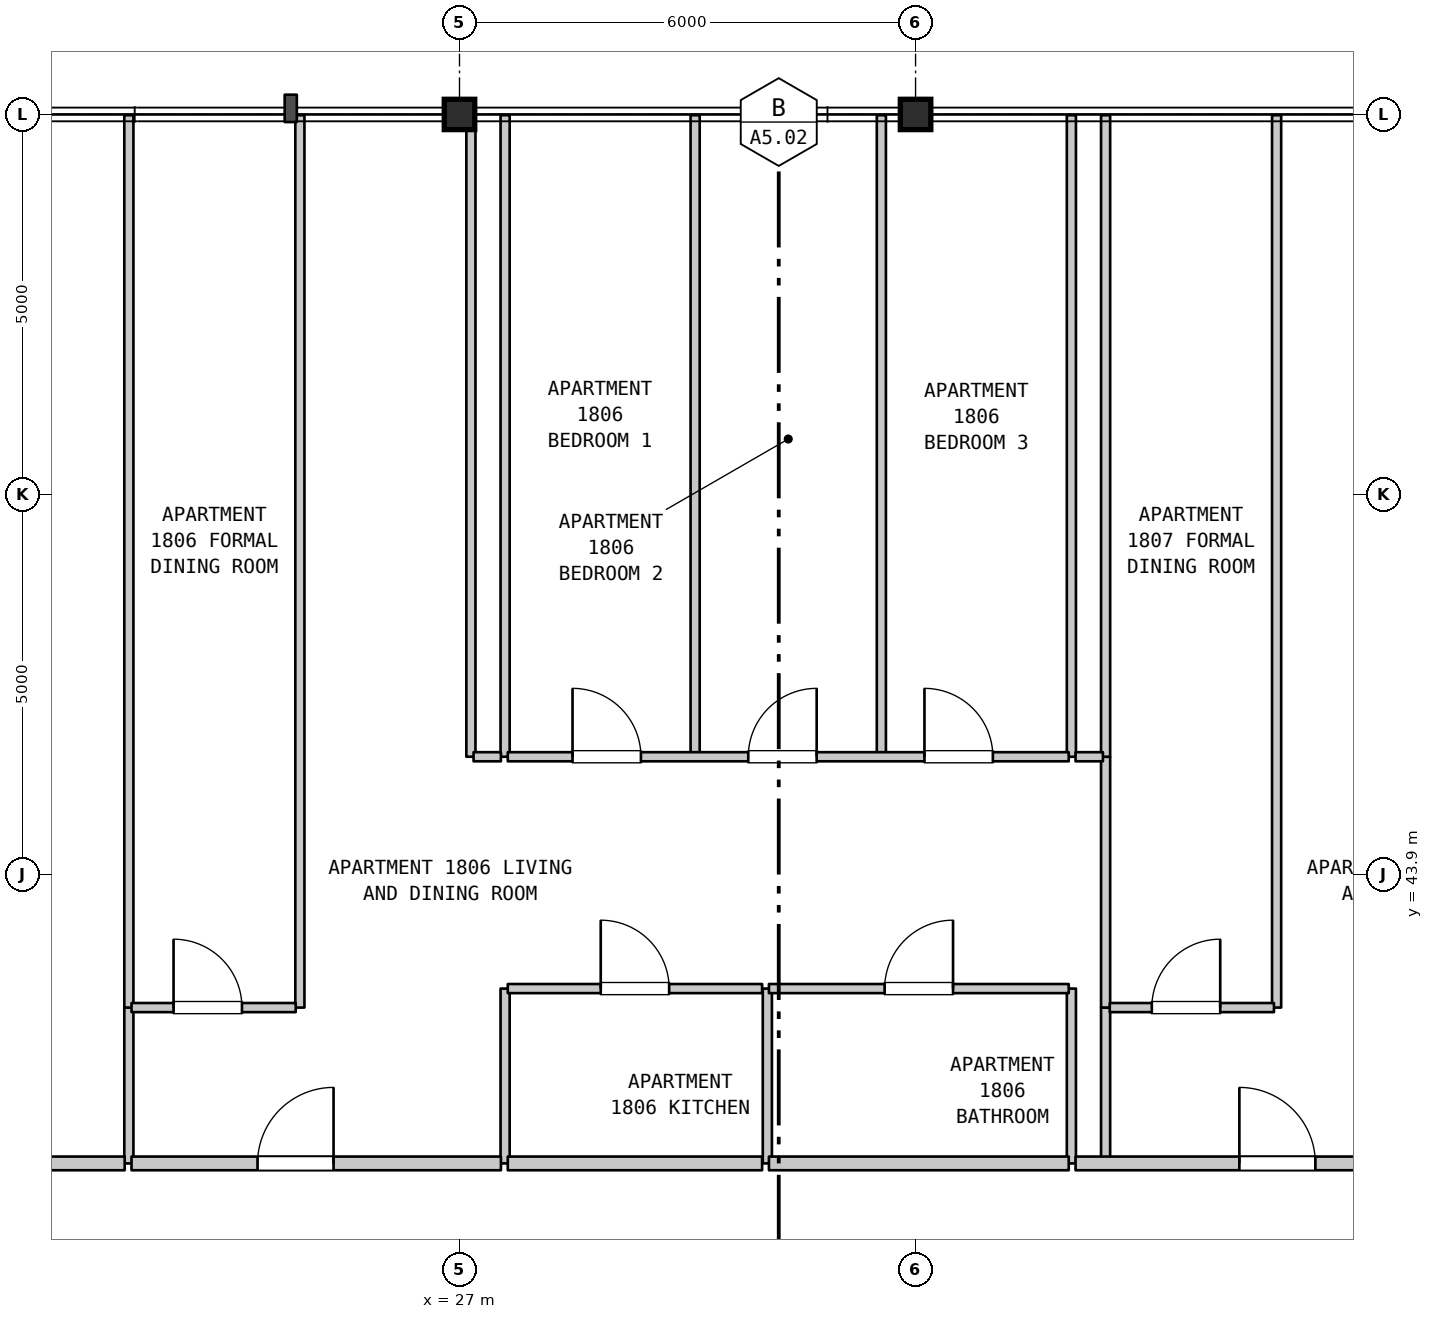
"""IFC4 building model, lengths in metres.
Left out: names, types, materials, properties, quantities, classifications, styles, units other than length and angle.
Written with IfcOpenShell. Run it as: python <this file> out.ifc"""

import sys

from ifc_helpers import new_model, si_unit, direction, frame, frame_2d, origin, origin_2d, place, context, subcontext, project, spatial, rectangle, i_section, extrude, element, fill, save


model = new_model("IFC4")
c1 = context("Model", 3, precision=1e-05, world=origin(), true_north=direction((0.0, 1.0)))
c2 = subcontext(c1, "Body", "Model", "MODEL_VIEW")
j1 = project(units=[si_unit("LENGTHUNIT", "METRE"), si_unit("PLANEANGLEUNIT", "RADIAN")], contexts=[c1])
p1 = place(None, origin())
s1 = spatial("IfcSite", under=j1, at=p1, CompositionType="ELEMENT")
p2 = place(p1, origin())
s2 = spatial("IfcBuilding", under=s1, at=p2, CompositionType="ELEMENT")
p3 = place(p2, frame((0.0, 0.0, 77.5)))
s3 = spatial("IfcBuildingStorey", under=s2, at=p3, CompositionType="ELEMENT", Elevation=77.5)
for number, where, z_axis, x_axis in (
    (1, (27.0, 53.9, 0.0), (0.0, 0.0, 1.0), (1.0, 0.0, 0.0)),
    (2, (33.0, 53.9, 0.0), (0.0, 0.0, 1.0), (1.0, 0.0, 0.0)),
):
    element("IfcColumn", number, at=place(p3, frame(where, z_axis=z_axis, x_axis=x_axis)), inside=s3, PredefinedType="COLUMN", context=c2, shape_type="SweptSolid", body=[
        extrude(i_section(OverallWidth=0.401, OverallDepth=0.399, WebThickness=0.025, FlangeThickness=0.04, FilletRadius=0.015, at=origin_2d()), origin(), (0.0, 0.0, 1.0), 3.7),
    ])
p4 = place(p3, frame((22.65, 40.1, 0.0), z_axis=(0.0, 0.0, 1.0), x_axis=(0.0, 1.0, 0.0)))
e3 = element("IfcWall", 3, at=p4, inside=s3, PredefinedType="PARTITIONING", context=c2, shape_type="SweptSolid", body=[
    extrude(rectangle(XDim=2.05, YDim=0.12, at=frame_2d((1.025, 0.0))), origin(), (0.0, 0.0, 1.0), 3.28),
])
for number, where, z_axis, x_axis in (
    (4, (22.65, 42.15, 0.0), (0.0, 0.0, 1.0), (0.0, 1.0, 0.0)),
    (5, (24.9, 42.15, 0.0), (0.0, 0.0, 1.0), (0.0, 1.0, 0.0)),
):
    element("IfcWall", number, at=place(p3, frame(where, z_axis=z_axis, x_axis=x_axis)), inside=s3, PredefinedType="PARTITIONING", context=c2, shape_type="SweptSolid", body=[
        extrude(rectangle(XDim=11.74, YDim=0.12, at=frame_2d((5.87, 0.0))), origin(), (0.0, 0.0, 1.0), 3.28),
    ])
p5 = place(p3, frame((27.15, 45.45, 0.0), z_axis=(0.0, 0.0, 1.0), x_axis=(0.0, 1.0, 0.0)))
e6 = element("IfcWall", 6, at=p5, inside=s3, PredefinedType="PARTITIONING", context=c2, shape_type="SweptSolid", body=[
    extrude(rectangle(XDim=8.44, YDim=0.12, at=frame_2d((4.22, 0.0))), origin(), (0.0, 0.0, 1.0), 3.28),
])
p6 = place(p3, frame((27.6, 40.1, 0.0), z_axis=(0.0, 0.0, 1.0), x_axis=(0.0, 1.0, 0.0)))
e7 = element("IfcWall", 7, at=p6, inside=s3, PredefinedType="PARTITIONING", context=c2, shape_type="SweptSolid", body=[
    extrude(rectangle(XDim=2.3, YDim=0.12, at=frame_2d((1.15, 0.0))), origin(), (0.0, 0.0, 1.0), 3.28),
])
for number, where, z_axis, x_axis in (
    (8, (27.6, 45.45, 0.0), (0.0, 0.0, 1.0), (0.0, 1.0, 0.0)),
    (9, (30.1, 45.45, 0.0), (0.0, 0.0, 1.0), (0.0, 1.0, 0.0)),
):
    element("IfcWall", number, at=place(p3, frame(where, z_axis=z_axis, x_axis=x_axis)), inside=s3, PredefinedType="PARTITIONING", context=c2, shape_type="SweptSolid", body=[
        extrude(rectangle(XDim=8.44, YDim=0.12, at=frame_2d((4.22, 0.0))), origin(), (0.0, 0.0, 1.0), 3.28),
    ])
p7 = place(p3, frame((31.05, 40.1, 0.0), z_axis=(0.0, 0.0, 1.0), x_axis=(0.0, 1.0, 0.0)))
e10 = element("IfcWall", 10, at=p7, inside=s3, PredefinedType="PARTITIONING", context=c2, shape_type="SweptSolid", body=[
    extrude(rectangle(XDim=2.3, YDim=0.12, at=frame_2d((1.15, 0.0))), origin(), (0.0, 0.0, 1.0), 3.28),
])
p8 = place(p3, frame((32.55, 45.45, 0.0), z_axis=(0.0, 0.0, 1.0), x_axis=(0.0, 1.0, 0.0)))
e11 = element("IfcWall", 11, at=p8, inside=s3, PredefinedType="PARTITIONING", context=c2, shape_type="SweptSolid", body=[
    extrude(rectangle(XDim=8.44, YDim=0.12, at=frame_2d((4.22, 0.0))), origin(), (0.0, 0.0, 1.0), 3.28),
])
p9 = place(p3, frame((35.05, 40.1, 0.0), z_axis=(0.0, 0.0, 1.0), x_axis=(0.0, 1.0, 0.0)))
e12 = element("IfcWall", 12, at=p9, inside=s3, PredefinedType="PARTITIONING", context=c2, shape_type="SweptSolid", body=[
    extrude(rectangle(XDim=2.3, YDim=0.12, at=frame_2d((1.15, 0.0))), origin(), (0.0, 0.0, 1.0), 3.28),
])
p10 = place(p3, frame((35.05, 45.45, 0.0), z_axis=(0.0, 0.0, 1.0), x_axis=(0.0, 1.0, 0.0)))
e13 = element("IfcWall", 13, at=p10, inside=s3, PredefinedType="PARTITIONING", context=c2, shape_type="SweptSolid", body=[
    extrude(rectangle(XDim=8.44, YDim=0.12, at=frame_2d((4.22, 0.0))), origin(), (0.0, 0.0, 1.0), 3.28),
])
p11 = place(p3, frame((35.5, 40.1, 0.0), z_axis=(0.0, 0.0, 1.0), x_axis=(0.0, 1.0, 0.0)))
e14 = element("IfcWall", 14, at=p11, inside=s3, PredefinedType="PARTITIONING", context=c2, shape_type="SweptSolid", body=[
    extrude(rectangle(XDim=2.05, YDim=0.12, at=frame_2d((1.025, 0.0))), origin(), (0.0, 0.0, 1.0), 3.28),
])
p12 = place(p3, frame((35.5, 42.15, 0.0), z_axis=(0.0, 0.0, 1.0), x_axis=(0.0, 1.0, 0.0)))
e15 = element("IfcWall", 15, at=p12, inside=s3, PredefinedType="PARTITIONING", context=c2, shape_type="SweptSolid", body=[
    extrude(rectangle(XDim=3.3, YDim=0.12, at=frame_2d((1.65, 0.0))), origin(), (0.0, 0.0, 1.0), 3.28),
])
p13 = place(p3, frame((35.5, 45.45, 0.0), z_axis=(0.0, 0.0, 1.0), x_axis=(0.0, 1.0, 0.0)))
e16 = element("IfcWall", 16, at=p13, inside=s3, PredefinedType="PARTITIONING", context=c2, shape_type="SweptSolid", body=[
    extrude(rectangle(XDim=8.44, YDim=0.12, at=frame_2d((4.22, 0.0))), origin(), (0.0, 0.0, 1.0), 3.28),
])
p14 = place(p3, frame((37.75, 42.15, 0.0), z_axis=(0.0, 0.0, 1.0), x_axis=(0.0, 1.0, 0.0)))
e17 = element("IfcWall", 17, at=p14, inside=s3, PredefinedType="PARTITIONING", context=c2, shape_type="SweptSolid", body=[
    extrude(rectangle(XDim=11.74, YDim=0.12, at=frame_2d((5.87, 0.0))), origin(), (0.0, 0.0, 1.0), 3.28),
])
p15 = place(p3, frame((20.185, 40.1, 0.0), z_axis=(0.0, 0.0, 1.0), x_axis=(1.0, 0.0, 0.0)))
e18 = element("IfcWall", 18, at=p15, inside=s3, PredefinedType="STANDARD", context=c2, shape_type="SweptSolid", body=[
    extrude(rectangle(XDim=2.41, YDim=0.18, at=frame_2d((1.205, 0.0))), origin(), (0.0, 0.0, 1.0), 3.28),
])
p16 = place(p3, frame((22.685, 40.1, 0.0), z_axis=(0.0, 0.0, 1.0), x_axis=(1.0, 0.0, 0.0)))
e19 = element("IfcWall", 19, at=p16, inside=s3, PredefinedType="STANDARD", context=c2, shape_type="SweptSolid", body=[
    extrude(rectangle(XDim=4.86, YDim=0.18, at=frame_2d((2.43, 0.0))), origin(), (0.0, 0.0, 1.0), 3.28),
])
p17 = place(p16, frame((1.658, 0.0, 0.0)))
e20 = element("IfcOpeningElement", 20, at=p17, cuts=e19, PredefinedType="OPENING", context=c2, shape_type="SweptSolid", body=[
    extrude(rectangle(XDim=1.0, YDim=2.15, at=frame_2d((0.5, 1.075))), frame((0.0, 0.1, 0.0), z_axis=(0.0, -1.0, 0.0), x_axis=(1.0, 0.0, 0.0)), (0.0, 0.0, 1.0), 0.2),
])
p18 = place(p3, frame((27.635, 40.1, 0.0), z_axis=(0.0, 0.0, 1.0), x_axis=(1.0, 0.0, 0.0)))
e21 = element("IfcWall", 21, at=p18, inside=s3, PredefinedType="STANDARD", context=c2, shape_type="SweptSolid", body=[
    extrude(rectangle(XDim=3.346, YDim=0.18, at=frame_2d((1.673, 0.0))), origin(), (0.0, 0.0, 1.0), 3.28),
])
p19 = place(p3, frame((31.071, 40.1, 0.0), z_axis=(0.0, 0.0, 1.0), x_axis=(1.0, 0.0, 0.0)))
e22 = element("IfcWall", 22, at=p19, inside=s3, PredefinedType="STANDARD", context=c2, shape_type="SweptSolid", body=[
    extrude(rectangle(XDim=3.944, YDim=0.18, at=frame_2d((1.972, 0.0))), origin(), (0.0, 0.0, 1.0), 3.28),
])
p20 = place(p3, frame((35.105, 40.1, 0.0), z_axis=(0.0, 0.0, 1.0), x_axis=(1.0, 0.0, 0.0)))
e23 = element("IfcWall", 23, at=p20, inside=s3, PredefinedType="STANDARD", context=c2, shape_type="SweptSolid", body=[
    extrude(rectangle(XDim=5.31, YDim=0.18, at=frame_2d((2.655, 0.0))), origin(), (0.0, 0.0, 1.0), 3.28),
])
p21 = place(p20, frame((2.155, 0.0, 0.0)))
e24 = element("IfcOpeningElement", 24, at=p21, cuts=e23, PredefinedType="OPENING", context=c2, shape_type="SweptSolid", body=[
    extrude(rectangle(XDim=1.0, YDim=2.15, at=frame_2d((0.5, 1.075))), frame((0.0, 0.1, 0.0), z_axis=(0.0, -1.0, 0.0), x_axis=(1.0, 0.0, 0.0)), (0.0, 0.0, 1.0), 0.2),
])
p22 = place(p3, frame((22.685, 42.15, 0.0), z_axis=(0.0, 0.0, 1.0), x_axis=(1.0, 0.0, 0.0)))
e25 = element("IfcWall", 25, at=p22, inside=s3, PredefinedType="PARTITIONING", context=c2, shape_type="SweptSolid", body=[
    extrude(rectangle(XDim=2.16, YDim=0.12, at=frame_2d((1.08, 0.0))), origin(), (0.0, 0.0, 1.0), 3.28),
])
p23 = place(p22, frame((0.553, 0.0, 0.0)))
e26 = element("IfcOpeningElement", 26, at=p23, cuts=e25, PredefinedType="OPENING", context=c2, shape_type="SweptSolid", body=[
    extrude(rectangle(XDim=0.9, YDim=2.15, at=frame_2d((0.45, 1.075))), frame((0.0, 0.07, 0.0), z_axis=(0.0, -1.0, 0.0), x_axis=(1.0, 0.0, 0.0)), (0.0, 0.0, 1.0), 0.14),
])
p24 = place(p3, frame((35.555, 42.15, 0.0), z_axis=(0.0, 0.0, 1.0), x_axis=(1.0, 0.0, 0.0)))
e27 = element("IfcWall", 27, at=p24, inside=s3, PredefinedType="PARTITIONING", context=c2, shape_type="SweptSolid", body=[
    extrude(rectangle(XDim=2.16, YDim=0.12, at=frame_2d((1.08, 0.0))), origin(), (0.0, 0.0, 1.0), 3.28),
])
p25 = place(p24, frame((0.553, 0.0, 0.0)))
e28 = element("IfcOpeningElement", 28, at=p25, cuts=e27, PredefinedType="OPENING", context=c2, shape_type="SweptSolid", body=[
    extrude(rectangle(XDim=0.9, YDim=2.15, at=frame_2d((0.45, 1.075))), frame((0.0, 0.07, 0.0), z_axis=(0.0, -1.0, 0.0), x_axis=(1.0, 0.0, 0.0)), (0.0, 0.0, 1.0), 0.14),
])
p26 = place(p3, frame((27.635, 42.4, 0.0), z_axis=(0.0, 0.0, 1.0), x_axis=(1.0, 0.0, 0.0)))
e29 = element("IfcWall", 29, at=p26, inside=s3, PredefinedType="PARTITIONING", context=c2, shape_type="SweptSolid", body=[
    extrude(rectangle(XDim=3.346, YDim=0.12, at=frame_2d((1.673, 0.0))), origin(), (0.0, 0.0, 1.0), 3.28),
])
p27 = place(p26, frame((1.223, 0.0, 0.0)))
e30 = element("IfcOpeningElement", 30, at=p27, cuts=e29, PredefinedType="OPENING", context=c2, shape_type="SweptSolid", body=[
    extrude(rectangle(XDim=0.9, YDim=2.15, at=frame_2d((0.45, 1.075))), frame((0.0, 0.07, 0.0), z_axis=(0.0, -1.0, 0.0), x_axis=(1.0, 0.0, 0.0)), (0.0, 0.0, 1.0), 0.14),
])
p28 = place(p3, frame((31.071, 42.4, 0.0), z_axis=(0.0, 0.0, 1.0), x_axis=(1.0, 0.0, 0.0)))
e31 = element("IfcWall", 31, at=p28, inside=s3, PredefinedType="PARTITIONING", context=c2, shape_type="SweptSolid", body=[
    extrude(rectangle(XDim=3.944, YDim=0.12, at=frame_2d((1.972, 0.0))), origin(), (0.0, 0.0, 1.0), 3.28),
])
p29 = place(p28, frame((1.522, 0.0, 0.0)))
e32 = element("IfcOpeningElement", 32, at=p29, cuts=e31, PredefinedType="OPENING", context=c2, shape_type="SweptSolid", body=[
    extrude(rectangle(XDim=0.9, YDim=2.1, at=frame_2d((0.45, 1.05))), frame((0.0, 0.07, 0.0), z_axis=(0.0, -1.0, 0.0), x_axis=(1.0, 0.0, 0.0)), (0.0, 0.0, 1.0), 0.14),
])
p30 = place(p3, frame((27.185, 45.45, 0.0), z_axis=(0.0, 0.0, 1.0), x_axis=(1.0, 0.0, 0.0)))
e33 = element("IfcWall", 33, at=p30, inside=s3, PredefinedType="PARTITIONING", context=c2, shape_type="SweptSolid", body=[
    extrude(rectangle(XDim=0.36, YDim=0.12, at=frame_2d((0.18, 0.0))), origin(), (0.0, 0.0, 1.0), 3.28),
])
p31 = place(p3, frame((27.635, 45.45, 0.0), z_axis=(0.0, 0.0, 1.0), x_axis=(1.0, 0.0, 0.0)))
e34 = element("IfcWall", 34, at=p31, inside=s3, PredefinedType="PARTITIONING", context=c2, shape_type="SweptSolid", body=[
    extrude(rectangle(XDim=7.38, YDim=0.12, at=frame_2d((3.69, 0.0))), origin(), (0.0, 0.0, 1.0), 3.28),
])
p32 = place(p31, frame((0.852, 0.0, 0.0)))
e35 = element("IfcOpeningElement", 35, at=p32, cuts=e34, PredefinedType="OPENING", context=c2, shape_type="SweptSolid", body=[
    extrude(rectangle(XDim=0.9, YDim=2.15, at=frame_2d((0.45, 1.075))), frame((0.0, 0.07, 0.0), z_axis=(0.0, -1.0, 0.0), x_axis=(1.0, 0.0, 0.0)), (0.0, 0.0, 1.0), 0.14),
])
p33 = place(p31, frame((3.164, 0.0, 0.0)))
e36 = element("IfcOpeningElement", 36, at=p33, cuts=e34, PredefinedType="OPENING", context=c2, shape_type="SweptSolid", body=[
    extrude(rectangle(XDim=0.9, YDim=2.15, at=frame_2d((0.45, 1.075))), frame((0.0, 0.07, 0.0), z_axis=(0.0, -1.0, 0.0), x_axis=(1.0, 0.0, 0.0)), (0.0, 0.0, 1.0), 0.14),
])
p34 = place(p31, frame((5.482, 0.0, 0.0)))
e37 = element("IfcOpeningElement", 37, at=p34, cuts=e34, PredefinedType="OPENING", context=c2, shape_type="SweptSolid", body=[
    extrude(rectangle(XDim=0.9, YDim=2.15, at=frame_2d((0.45, 1.075))), frame((0.0, 0.07, 0.0), z_axis=(0.0, -1.0, 0.0), x_axis=(1.0, 0.0, 0.0)), (0.0, 0.0, 1.0), 0.14),
])
p35 = place(p3, frame((35.105, 45.45, 0.0), z_axis=(0.0, 0.0, 1.0), x_axis=(1.0, 0.0, 0.0)))
e38 = element("IfcWall", 38, at=p35, inside=s3, PredefinedType="PARTITIONING", context=c2, shape_type="SweptSolid", body=[
    extrude(rectangle(XDim=0.36, YDim=0.12, at=frame_2d((0.18, 0.0))), origin(), (0.0, 0.0, 1.0), 3.28),
])
p36 = place(p17, origin())
e39 = element("IfcDoor", 39, at=p36, inside=s3, OperationType="SINGLE_SWING_RIGHT", PredefinedType="DOOR", context=c2, shape_type="SweptSolid", body=[
    extrude(rectangle(XDim=1.0, YDim=2.15, at=frame_2d((0.5, 1.075))), frame((0.0, 0.025, 0.0), z_axis=(0.0, -1.0, 0.0), x_axis=(1.0, 0.0, 0.0)), (0.0, 0.0, 1.0), 0.05),
])
fill(e20, e39)
p37 = place(p21, origin())
e40 = element("IfcDoor", 40, at=p37, inside=s3, OperationType="SINGLE_SWING_LEFT", PredefinedType="DOOR", context=c2, shape_type="SweptSolid", body=[
    extrude(rectangle(XDim=1.0, YDim=2.15, at=frame_2d((0.5, 1.075))), frame((0.0, 0.025, 0.0), z_axis=(0.0, -1.0, 0.0), x_axis=(1.0, 0.0, 0.0)), (0.0, 0.0, 1.0), 0.05),
])
fill(e24, e40)
p38 = place(p23, origin())
e41 = element("IfcDoor", 41, at=p38, inside=s3, OperationType="SINGLE_SWING_LEFT", PredefinedType="DOOR", context=c2, shape_type="SweptSolid", body=[
    extrude(rectangle(XDim=0.9, YDim=2.15, at=frame_2d((0.45, 1.075))), frame((0.0, 0.025, 0.0), z_axis=(0.0, -1.0, 0.0), x_axis=(1.0, 0.0, 0.0)), (0.0, 0.0, 1.0), 0.05),
])
fill(e26, e41)
p39 = place(p25, origin())
e42 = element("IfcDoor", 42, at=p39, inside=s3, OperationType="SINGLE_SWING_RIGHT", PredefinedType="DOOR", context=c2, shape_type="SweptSolid", body=[
    extrude(rectangle(XDim=0.9, YDim=2.15, at=frame_2d((0.45, 1.075))), frame((0.0, 0.025, 0.0), z_axis=(0.0, -1.0, 0.0), x_axis=(1.0, 0.0, 0.0)), (0.0, 0.0, 1.0), 0.05),
])
fill(e28, e42)
p40 = place(p27, origin())
e43 = element("IfcDoor", 43, at=p40, inside=s3, OperationType="SINGLE_SWING_LEFT", PredefinedType="DOOR", context=c2, shape_type="SweptSolid", body=[
    extrude(rectangle(XDim=0.9, YDim=2.15, at=frame_2d((0.45, 1.075))), frame((0.0, 0.025, 0.0), z_axis=(0.0, -1.0, 0.0), x_axis=(1.0, 0.0, 0.0)), (0.0, 0.0, 1.0), 0.05),
])
fill(e30, e43)
p41 = place(p29, origin())
e44 = element("IfcDoor", 44, at=p41, inside=s3, OperationType="SINGLE_SWING_RIGHT", PredefinedType="DOOR", context=c2, shape_type="SweptSolid", body=[
    extrude(rectangle(XDim=0.9, YDim=2.1, at=frame_2d((0.45, 1.05))), frame((0.0, 0.025, 0.0), z_axis=(0.0, -1.0, 0.0), x_axis=(1.0, 0.0, 0.0)), (0.0, 0.0, 1.0), 0.05),
])
fill(e32, e44)
p42 = place(p32, origin())
e45 = element("IfcDoor", 45, at=p42, inside=s3, OperationType="SINGLE_SWING_LEFT", PredefinedType="DOOR", context=c2, shape_type="SweptSolid", body=[
    extrude(rectangle(XDim=0.9, YDim=2.15, at=frame_2d((0.45, 1.075))), frame((0.0, 0.025, 0.0), z_axis=(0.0, -1.0, 0.0), x_axis=(1.0, 0.0, 0.0)), (0.0, 0.0, 1.0), 0.05),
])
fill(e35, e45)
p43 = place(p33, origin())
e46 = element("IfcDoor", 46, at=p43, inside=s3, OperationType="SINGLE_SWING_RIGHT", PredefinedType="DOOR", context=c2, shape_type="SweptSolid", body=[
    extrude(rectangle(XDim=0.9, YDim=2.15, at=frame_2d((0.45, 1.075))), frame((0.0, 0.025, 0.0), z_axis=(0.0, -1.0, 0.0), x_axis=(1.0, 0.0, 0.0)), (0.0, 0.0, 1.0), 0.05),
])
fill(e36, e46)
p44 = place(p34, origin())
e47 = element("IfcDoor", 47, at=p44, inside=s3, OperationType="SINGLE_SWING_LEFT", PredefinedType="DOOR", context=c2, shape_type="SweptSolid", body=[
    extrude(rectangle(XDim=0.9, YDim=2.15, at=frame_2d((0.45, 1.075))), frame((0.0, 0.025, 0.0), z_axis=(0.0, -1.0, 0.0), x_axis=(1.0, 0.0, 0.0)), (0.0, 0.0, 1.0), 0.05),
])
fill(e37, e47)
save(model, sys.argv[1])
